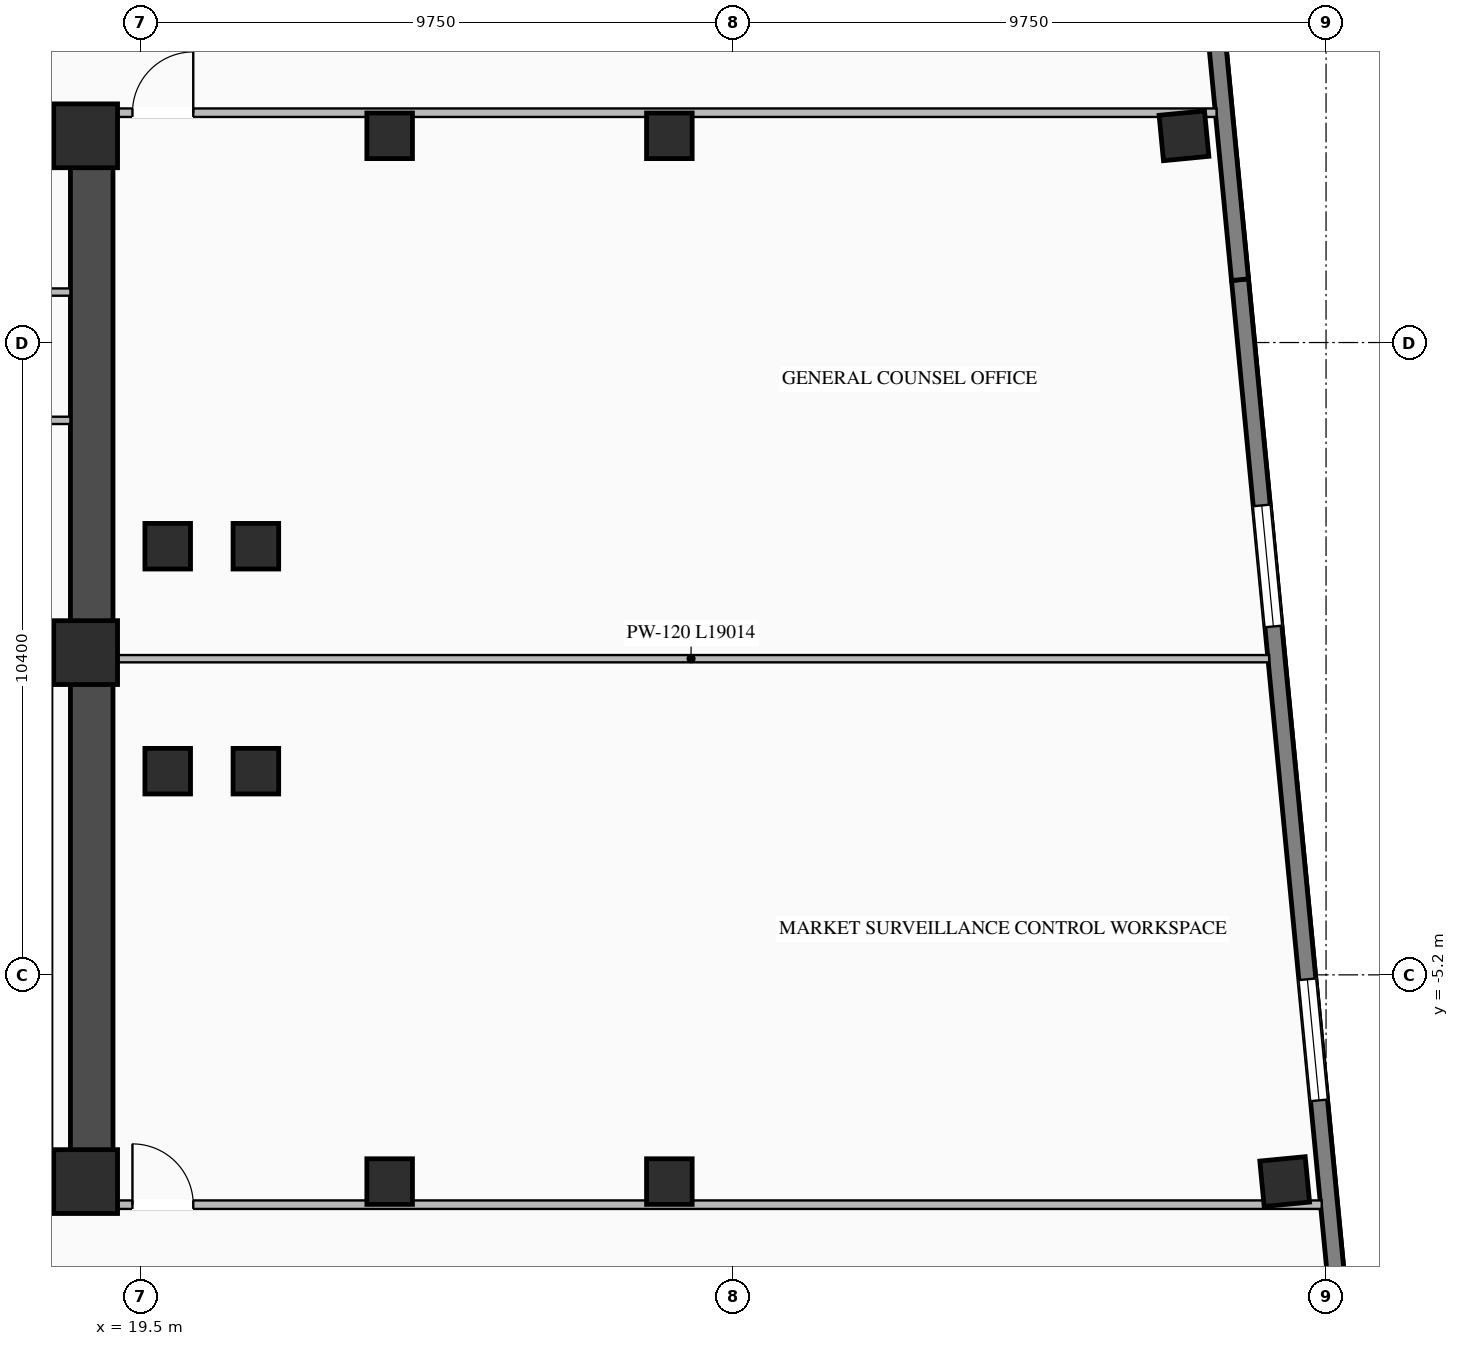
"""IFC4 building model, lengths in metres.
Left out: names, types, materials, properties, quantities, classifications, styles, units other than length and angle.
Written with IfcOpenShell. Run it as: python <this file> out.ifc"""

import sys

from ifc_helpers import new_model, si_unit, direction, frame, frame_2d, origin, origin_2d, place, context, subcontext, project, spatial, rectangle, i_section, extrude, element, fill, save


model = new_model("IFC4")
c1 = context("Model", 3, precision=1e-05, world=origin(), true_north=direction((0.0, 1.0)))
c2 = subcontext(c1, "Body", "Model", "MODEL_VIEW")
j1 = project(units=[si_unit("LENGTHUNIT", "METRE"), si_unit("PLANEANGLEUNIT", "RADIAN")], contexts=[c1])
p1 = place(None, origin())
s1 = spatial("IfcSite", under=j1, at=p1, CompositionType="ELEMENT")
p2 = place(p1, origin())
s2 = spatial("IfcBuilding", under=s1, at=p2, CompositionType="ELEMENT")
p3 = place(p2, frame((0.0, 0.0, 70.0)))
s3 = spatial("IfcBuildingStorey", under=s2, at=p3, CompositionType="ELEMENT", Elevation=70.0)
p4 = place(p3, frame((8.8, -8.7, 0.0), z_axis=(0.0, 0.0, 1.0), x_axis=(1.0, 0.0, 0.0)))
e1 = element("IfcWall", 1, at=p4, inside=s3, PredefinedType="SHEAR", context=c2, shape_type="SweptSolid", body=[
    extrude(rectangle(XDim=10.25, YDim=0.7, at=frame_2d((5.125, 0.0))), origin(), (0.0, 0.0, 1.0), 4.02),
])
p5 = place(p3, frame((8.8, 8.7, 0.0), z_axis=(0.0, 0.0, 1.0), x_axis=(1.0, 0.0, 0.0)))
e2 = element("IfcWall", 2, at=p5, inside=s3, PredefinedType="SHEAR", context=c2, shape_type="SweptSolid", body=[
    extrude(rectangle(XDim=10.25, YDim=0.7, at=frame_2d((5.125, 0.0))), origin(), (0.0, 0.0, 1.0), 4.02),
])
p6 = place(p5, frame((3.25, 0.0, 0.0)))
e3 = element("IfcOpeningElement", 3, at=p6, cuts=e2, PredefinedType="OPENING", context=c2, shape_type="SweptSolid", body=[
    extrude(rectangle(XDim=1.4, YDim=2.05, at=frame_2d((0.7, 1.025))), frame((0.0, 0.36, 0.0), z_axis=(0.0, -1.0, 0.0), x_axis=(1.0, 0.0, 0.0)), (0.0, 0.0, 1.0), 0.72),
])
p7 = place(p3, frame((18.7, -8.35, 0.0), z_axis=(0.0, 0.0, 1.0), x_axis=(0.0, 1.0, 0.0)))
e4 = element("IfcWall", 4, at=p7, inside=s3, PredefinedType="SHEAR", context=c2, shape_type="SweptSolid", body=[
    extrude(rectangle(XDim=16.7, YDim=0.7, at=frame_2d((8.35, 0.0))), origin(), (0.0, 0.0, 1.0), 4.02),
])
for number, where, z_axis, x_axis in (
    (5, (18.6, -8.6, 0.0), (0.0, 0.0, 1.0), (1.0, 0.0, 0.0)),
    (6, (18.6, 0.1, 0.0), (0.0, 0.0, 1.0), (1.0, 0.0, 0.0)),
    (7, (18.6, 8.6, 0.0), (0.0, 0.0, 1.0), (1.0, 0.0, 0.0)),
):
    element("IfcColumn", number, at=place(p3, frame(where, z_axis=z_axis, x_axis=x_axis)), inside=s3, PredefinedType="COLUMN", context=c2, shape_type="SweptSolid", body=[
        extrude(rectangle(XDim=1.05, YDim=1.05, at=origin_2d()), origin(), (0.0, 0.0, 1.0), 4.2),
    ])
for number, where, z_axis, x_axis in (
    (8, (19.95, -1.85, 0.0), (0.0, 0.0, 1.0), (1.0, 0.0, 0.0)),
    (9, (19.95, 1.85, 0.0), (0.0, 0.0, 1.0), (1.0, 0.0, 0.0)),
    (10, (21.4, -1.85, 0.0), (0.0, 0.0, 1.0), (1.0, 0.0, 0.0)),
    (11, (21.4, 1.85, 0.0), (0.0, 0.0, 1.0), (1.0, 0.0, 0.0)),
    (12, (23.6, -8.6, 0.0), (0.0, 0.0, 1.0), (1.0, 0.0, 0.0)),
    (13, (23.6, 8.6, 0.0), (0.0, 0.0, 1.0), (1.0, 0.0, 0.0)),
    (14, (28.2, -8.6, 0.0), (0.0, 0.0, 1.0), (1.0, 0.0, 0.0)),
    (15, (28.2, 8.6, 0.0), (0.0, 0.0, 1.0), (1.0, 0.0, 0.0)),
):
    element("IfcColumn", number, at=place(p3, frame(where, z_axis=z_axis, x_axis=x_axis)), inside=s3, PredefinedType="COLUMN", context=c2, shape_type="SweptSolid", body=[
        extrude(i_section(OverallWidth=0.75, OverallDepth=0.75, WebThickness=0.03, FlangeThickness=0.044, at=origin_2d()), origin(), (0.0, 0.0, 1.0), 4.2),
    ])
for number, where, z_axis, x_axis in (
    (16, (38.32, -8.6, -0.28), (0.0, 0.0, 1.0), (0.995, 0.096, 0.0)),
    (17, (36.664, 8.6, -0.28), (0.0, 0.0, 1.0), (0.995, 0.096, 0.0)),
):
    element("IfcColumn", number, at=place(p3, frame(where, z_axis=z_axis, x_axis=x_axis)), inside=s3, PredefinedType="COLUMN", context=c2, shape_type="SweptSolid", body=[
        extrude(i_section(OverallWidth=0.75, OverallDepth=0.75, WebThickness=0.03, FlangeThickness=0.044, at=origin_2d()), origin(), (0.0, 0.0, 1.0), 4.48),
    ])
p8 = place(p3, frame((37.585, 6.234, 0.0), z_axis=(0.0, 0.0, 1.0), x_axis=(0.095841297881, -0.99539662729, 0.0)))
e18 = element("IfcWall", 18, at=p8, inside=s3, PredefinedType="STANDARD", context=c2, shape_type="SweptSolid", body=[
    extrude(rectangle(XDim=18.84, YDim=0.28, at=frame_2d((9.42, 0.0))), origin(), (0.0, 0.0, 1.0), 4.0),
])
p9 = place(p8, frame((3.73, 0.0, 0.76)))
e19 = element("IfcOpeningElement", 19, at=p9, cuts=e18, PredefinedType="OPENING", context=c2, shape_type="SweptSolid", body=[
    extrude(rectangle(XDim=2.0, YDim=2.05, at=frame_2d((1.0, 1.025))), frame((0.0, 0.15, 0.0), z_axis=(0.0, -1.0, 0.0), x_axis=(1.0, 0.0, 0.0)), (0.0, 0.0, 1.0), 0.3),
])
p10 = place(p8, frame((11.56, 0.0, 0.76)))
e20 = element("IfcOpeningElement", 20, at=p10, cuts=e18, PredefinedType="OPENING", context=c2, shape_type="SweptSolid", body=[
    extrude(rectangle(XDim=2.0, YDim=2.05, at=frame_2d((1.0, 1.025))), frame((0.0, 0.15, 0.0), z_axis=(0.0, -1.0, 0.0), x_axis=(1.0, 0.0, 0.0)), (0.0, 0.0, 1.0), 0.3),
])
p11 = place(p3, frame((35.779, 24.987, 0.0), z_axis=(0.0, 0.0, 1.0), x_axis=(0.095842534142, -0.995396508256, 0.0)))
e21 = element("IfcWall", 21, at=p11, inside=s3, PredefinedType="STANDARD", context=c2, shape_type="SweptSolid", body=[
    extrude(rectangle(XDim=18.84, YDim=0.28, at=frame_2d((9.42, 0.0))), origin(), (0.0, 0.0, 1.0), 4.0),
])
p12 = place(p11, frame((5.28, 0.0, 0.76)))
e22 = element("IfcOpeningElement", 22, at=p12, cuts=e21, PredefinedType="OPENING", context=c2, shape_type="SweptSolid", body=[
    extrude(rectangle(XDim=2.0, YDim=2.05, at=frame_2d((1.0, 1.025))), frame((0.0, 0.15, 0.0), z_axis=(0.0, -1.0, 0.0), x_axis=(1.0, 0.0, 0.0)), (0.0, 0.0, 1.0), 0.3),
])
p13 = place(p11, frame((11.56, 0.0, 0.76)))
e23 = element("IfcOpeningElement", 23, at=p13, cuts=e21, PredefinedType="OPENING", context=c2, shape_type="SweptSolid", body=[
    extrude(rectangle(XDim=2.0, YDim=2.05, at=frame_2d((1.0, 1.025))), frame((0.0, 0.15, 0.0), z_axis=(0.0, -1.0, 0.0), x_axis=(1.0, 0.0, 0.0)), (0.0, 0.0, 1.0), 0.3),
])
p14 = place(p3, frame((13.9, 3.92, 0.0), z_axis=(0.0, 0.0, 1.0), x_axis=(1.0, 0.0, 0.0)))
e24 = element("IfcWall", 24, at=p14, inside=s3, PredefinedType="STANDARD", context=c2, shape_type="SweptSolid", body=[
    extrude(rectangle(XDim=4.45, YDim=0.12, at=frame_2d((2.225, 0.0))), origin(), (0.0, 0.0, 1.0), 4.0),
])
p15 = place(p3, frame((16.15, 6.03, 0.0), z_axis=(0.0, 0.0, 1.0), x_axis=(1.0, 0.0, 0.0)))
e25 = element("IfcWall", 25, at=p15, inside=s3, PredefinedType="STANDARD", context=c2, shape_type="SweptSolid", body=[
    extrude(rectangle(XDim=2.2, YDim=0.12, at=frame_2d((1.1, 0.0))), origin(), (0.0, 0.0, 1.0), 4.0),
])
p16 = place(p3, frame((19.05, 8.98, 0.0), z_axis=(0.0, 0.0, 1.0), x_axis=(1.0, 0.0, 0.0)))
e26 = element("IfcWall", 26, at=p16, inside=s3, PredefinedType="STANDARD", context=c2, shape_type="SweptSolid", body=[
    extrude(rectangle(XDim=18.15, YDim=0.14, at=frame_2d((9.075, 0.0))), origin(), (0.0, 0.0, 1.0), 4.0),
])
p17 = place(p16, frame((0.32, 0.0, 0.0)))
e27 = element("IfcOpeningElement", 27, at=p17, cuts=e26, PredefinedType="OPENING", context=c2, shape_type="SweptSolid", body=[
    extrude(rectangle(XDim=1.0, YDim=2.08, at=frame_2d((0.5, 1.04))), frame((0.0, 0.08, 0.0), z_axis=(0.0, -1.0, 0.0), x_axis=(1.0, 0.0, 0.0)), (0.0, 0.0, 1.0), 0.16),
])
p18 = place(p3, frame((19.05, -8.98, 0.0), z_axis=(0.0, 0.0, 1.0), x_axis=(1.0, 0.0, 0.0)))
e28 = element("IfcWall", 28, at=p18, inside=s3, PredefinedType="STANDARD", context=c2, shape_type="SweptSolid", body=[
    extrude(rectangle(XDim=19.879, YDim=0.14, at=frame_2d((9.939, 0.0))), origin(), (0.0, 0.0, 1.0), 4.0),
])
p19 = place(p18, frame((0.32, 0.0, 0.0)))
e29 = element("IfcOpeningElement", 29, at=p19, cuts=e28, PredefinedType="OPENING", context=c2, shape_type="SweptSolid", body=[
    extrude(rectangle(XDim=1.0, YDim=2.08, at=frame_2d((0.5, 1.04))), frame((0.0, 0.08, 0.0), z_axis=(0.0, -1.0, 0.0), x_axis=(1.0, 0.0, 0.0)), (0.0, 0.0, 1.0), 0.16),
])
p20 = place(p3, frame((19.05, 0.0, 0.0), z_axis=(0.0, 0.0, 1.0), x_axis=(1.0, 0.0, 0.0)))
e30 = element("IfcWall", 30, at=p20, inside=s3, PredefinedType="STANDARD", context=c2, shape_type="SweptSolid", body=[
    extrude(rectangle(XDim=19.014, YDim=0.12, at=frame_2d((9.507, 0.0))), origin(), (0.0, 0.0, 1.0), 3.495),
])
p21 = place(p9, origin())
e31 = element("IfcWindow", 31, at=p21, inside=s3, PartitioningType="DOUBLE_PANEL_VERTICAL", PredefinedType="WINDOW", context=c2, shape_type="SweptSolid", body=[
    extrude(rectangle(XDim=2.0, YDim=2.05, at=frame_2d((1.0, 1.025))), frame((0.0, 0.03, 0.0), z_axis=(0.0, -1.0, 0.0), x_axis=(1.0, 0.0, 0.0)), (0.0, 0.0, 1.0), 0.06),
])
fill(e19, e31)
p22 = place(p10, origin())
e32 = element("IfcWindow", 32, at=p22, inside=s3, PartitioningType="DOUBLE_PANEL_VERTICAL", PredefinedType="WINDOW", context=c2, shape_type="SweptSolid", body=[
    extrude(rectangle(XDim=2.0, YDim=2.05, at=frame_2d((1.0, 1.025))), frame((0.0, 0.03, 0.0), z_axis=(0.0, -1.0, 0.0), x_axis=(1.0, 0.0, 0.0)), (0.0, 0.0, 1.0), 0.06),
])
fill(e20, e32)
p23 = place(p17, origin())
e33 = element("IfcDoor", 33, at=p23, inside=s3, OperationType="SINGLE_SWING_RIGHT", PredefinedType="DOOR", context=c2, shape_type="SweptSolid", body=[
    extrude(rectangle(XDim=1.0, YDim=2.08, at=frame_2d((0.5, 1.04))), frame((0.0, 0.025, 0.0), z_axis=(0.0, -1.0, 0.0), x_axis=(1.0, 0.0, 0.0)), (0.0, 0.0, 1.0), 0.05),
])
fill(e27, e33)
p24 = place(p19, origin())
e34 = element("IfcDoor", 34, at=p24, inside=s3, OperationType="SINGLE_SWING_LEFT", PredefinedType="DOOR", context=c2, shape_type="SweptSolid", body=[
    extrude(rectangle(XDim=1.0, YDim=2.08, at=frame_2d((0.5, 1.04))), frame((0.0, 0.025, 0.0), z_axis=(0.0, -1.0, 0.0), x_axis=(1.0, 0.0, 0.0)), (0.0, 0.0, 1.0), 0.05),
])
fill(e29, e34)
save(model, sys.argv[1])
